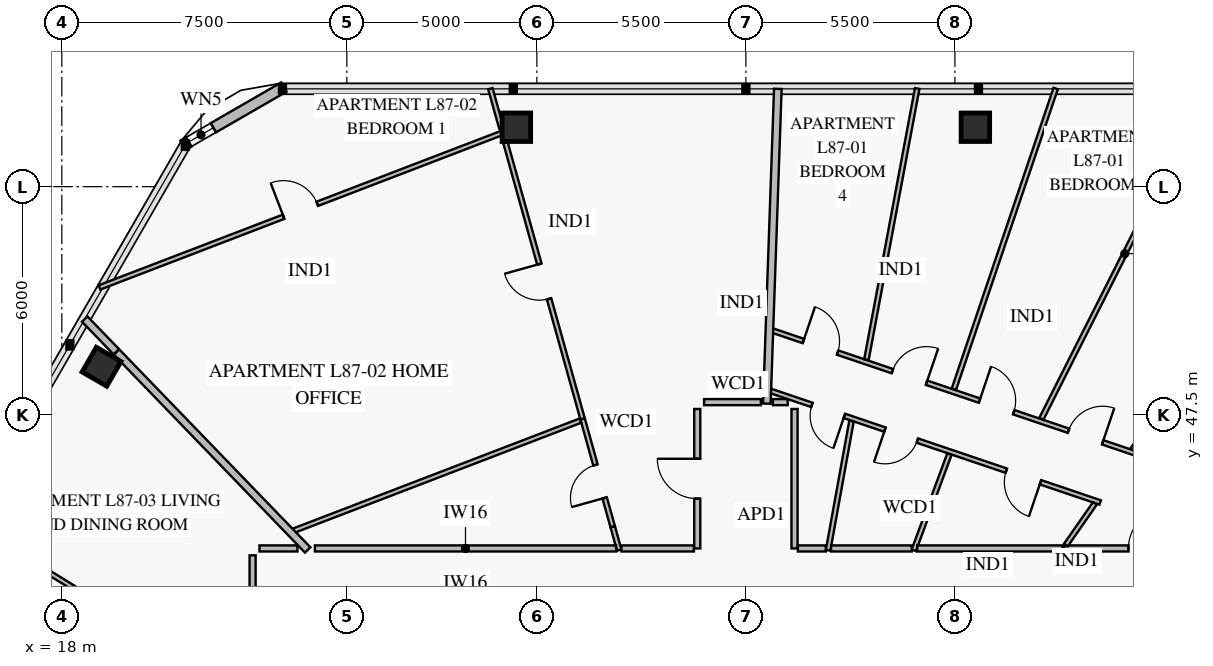
"""IFC4 building model, lengths in metres.
Left out: names, types, materials, properties, quantities, classifications, styles, units other than length and angle.
Written with IfcOpenShell. Run it as: python <this file> out.ifc"""

import sys

from ifc_helpers import new_model, si_unit, direction, frame, frame_2d, origin, origin_2d, place, context, subcontext, project, spatial, rectangle, extrude, element, fill, save


model = new_model("IFC4")
c1 = context("Model", 3, precision=1e-05, world=origin(), true_north=direction((0.0, 1.0)))
c2 = subcontext(c1, "Body", "Model", "MODEL_VIEW")
j1 = project(units=[si_unit("LENGTHUNIT", "METRE"), si_unit("PLANEANGLEUNIT", "RADIAN")], contexts=[c1])
p1 = place(None, origin())
s1 = spatial("IfcSite", under=j1, at=p1, CompositionType="ELEMENT")
p2 = place(p1, origin())
s2 = spatial("IfcBuilding", under=s1, at=p2, CompositionType="ELEMENT")
p3 = place(p2, frame((0.0, 0.0, 342.4)))
s3 = spatial("IfcBuildingStorey", under=s2, at=p3, CompositionType="ELEMENT", Elevation=342.4)
for number, where, z_axis, x_axis in (
    (1, (42.039, 55.064, 0.0), (0.0, 0.0, 1.0), (-1.0, 0.0, 0.0)),
    (2, (29.961, 55.064, 0.0), (0.0, 0.0, 1.0), (-1.0, 0.0, 0.0)),
    (3, (19.045, 48.762, 0.0), (0.0, 0.0, 1.0), (-0.5, -0.866, 0.0)),
):
    element("IfcColumn", number, at=place(p3, frame(where, z_axis=z_axis, x_axis=x_axis)), inside=s3, PredefinedType="COLUMN", context=c2, shape_type="SweptSolid", body=[
        extrude(rectangle(XDim=0.75, YDim=0.75, at=origin_2d()), origin(), (0.0, 0.0, 1.0), 3.55),
    ])
p4 = place(p3, frame((21.189, 54.589, 0.0), z_axis=(0.0, 0.0, 1.0), x_axis=(0.866023752521, 0.50000286006, 0.0)))
e4 = element("IfcWall", 4, at=p4, inside=s3, PredefinedType="SOLIDWALL", context=c2, shape_type="SweptSolid", body=[
    extrude(rectangle(XDim=3.065, YDim=0.28, at=frame_2d((1.532, 0.0))), origin(), (0.0, 0.0, 1.0), 3.55),
])
p5 = place(p4, frame((0.173, 0.0, 0.85)))
e5 = element("IfcOpeningElement", 5, at=p5, cuts=e4, PredefinedType="OPENING", context=c2, shape_type="SweptSolid", body=[
    extrude(rectangle(XDim=0.75, YDim=1.5, at=frame_2d((0.375, 0.75))), frame((0.0, 0.152, 0.0), z_axis=(0.0, -1.0, 0.0), x_axis=(1.0, 0.0, 0.0)), (0.0, 0.0, 1.0), 0.304),
])
p6 = place(p3, frame((45.323, 45.19, 0.0), z_axis=(0.0, 0.0, 1.0), x_axis=(-0.947209030083, 0.320616676625, 0.0)))
e6 = element("IfcWall", 6, at=p6, inside=s3, PredefinedType="PARTITIONING", context=c2, shape_type="SweptSolid", body=[
    extrude(rectangle(XDim=9.205, YDim=0.12, at=frame_2d((4.602, 0.0))), origin(), (0.0, 0.0, 1.0), 3.0),
])
p7 = place(p6, frame((1.659, 0.0, 0.0)))
e7 = element("IfcOpeningElement", 7, at=p7, cuts=e6, PredefinedType="OPENING", context=c2, shape_type="SweptSolid", body=[
    extrude(rectangle(XDim=0.95, YDim=2.1, at=frame_2d((0.475, 1.05))), frame((0.0, 0.072, 0.0), z_axis=(0.0, -1.0, 0.0), x_axis=(1.0, 0.0, 0.0)), (0.0, 0.0, 1.0), 0.144),
])
p8 = place(p6, frame((5.08, 0.0, 0.0)))
e8 = element("IfcOpeningElement", 8, at=p8, cuts=e6, PredefinedType="OPENING", context=c2, shape_type="SweptSolid", body=[
    extrude(rectangle(XDim=0.9, YDim=2.1, at=frame_2d((0.45, 1.05))), frame((0.0, 0.072, 0.0), z_axis=(0.0, -1.0, 0.0), x_axis=(1.0, 0.0, 0.0)), (0.0, 0.0, 1.0), 0.144),
])
p9 = place(p6, frame((7.107, 0.0, 0.0)))
e9 = element("IfcOpeningElement", 9, at=p9, cuts=e6, PredefinedType="OPENING", context=c2, shape_type="SweptSolid", body=[
    extrude(rectangle(XDim=0.9, YDim=2.1, at=frame_2d((0.45, 1.05))), frame((0.0, 0.072, 0.0), z_axis=(0.0, -1.0, 0.0), x_axis=(1.0, 0.0, 0.0)), (0.0, 0.0, 1.0), 0.144),
])
p10 = place(p3, frame((46.229, 46.488, 0.0), z_axis=(0.0, 0.0, 1.0), x_axis=(-0.947206471438, 0.320624235618, 0.0)))
e10 = element("IfcWall", 10, at=p10, inside=s3, PredefinedType="PARTITIONING", context=c2, shape_type="SweptSolid", body=[
    extrude(rectangle(XDim=10.088, YDim=0.12, at=frame_2d((5.044, 0.0))), origin(), (0.0, 0.0, 1.0), 3.0),
])
p11 = place(p10, frame((0.887, 0.0, 0.0)))
e11 = element("IfcOpeningElement", 11, at=p11, cuts=e10, PredefinedType="OPENING", context=c2, shape_type="SweptSolid", body=[
    extrude(rectangle(XDim=0.95, YDim=2.1, at=frame_2d((0.475, 1.05))), frame((0.0, 0.072, 0.0), z_axis=(0.0, -1.0, 0.0), x_axis=(1.0, 0.0, 0.0)), (0.0, 0.0, 1.0), 0.144),
])
p12 = place(p10, frame((3.358, 0.0, 0.0)))
e12 = element("IfcOpeningElement", 12, at=p12, cuts=e10, PredefinedType="OPENING", context=c2, shape_type="SweptSolid", body=[
    extrude(rectangle(XDim=0.95, YDim=2.1, at=frame_2d((0.475, 1.05))), frame((0.0, 0.072, 0.0), z_axis=(0.0, -1.0, 0.0), x_axis=(1.0, 0.0, 0.0)), (0.0, 0.0, 1.0), 0.144),
])
p13 = place(p10, frame((5.779, 0.0, 0.0)))
e13 = element("IfcOpeningElement", 13, at=p13, cuts=e10, PredefinedType="OPENING", context=c2, shape_type="SweptSolid", body=[
    extrude(rectangle(XDim=0.95, YDim=2.1, at=frame_2d((0.475, 1.05))), frame((0.0, 0.072, 0.0), z_axis=(0.0, -1.0, 0.0), x_axis=(1.0, 0.0, 0.0)), (0.0, 0.0, 1.0), 0.144),
])
p14 = place(p10, frame((8.251, 0.0, 0.0)))
e14 = element("IfcOpeningElement", 14, at=p14, cuts=e10, PredefinedType="OPENING", context=c2, shape_type="SweptSolid", body=[
    extrude(rectangle(XDim=0.95, YDim=2.1, at=frame_2d((0.475, 1.05))), frame((0.0, 0.072, 0.0), z_axis=(0.0, -1.0, 0.0), x_axis=(1.0, 0.0, 0.0)), (0.0, 0.0, 1.0), 0.144),
])
p15 = place(p3, frame((48.799, 43.98, 0.0), z_axis=(0.0, 0.0, 1.0), x_axis=(-1.0, 0.0, 0.0)))
e15 = element("IfcWall", 15, at=p15, inside=s3, PredefinedType="PARTITIONING", context=c2, shape_type="SweptSolid", body=[
    extrude(rectangle(XDim=4.418, YDim=0.16, at=frame_2d((2.209, 0.0))), origin(), (0.0, 0.0, 1.0), 3.0),
])
p16 = place(p15, frame((1.684, 0.0, 0.0)))
e16 = element("IfcOpeningElement", 16, at=p16, cuts=e15, PredefinedType="OPENING", context=c2, shape_type="SweptSolid", body=[
    extrude(rectangle(XDim=1.05, YDim=2.15, at=frame_2d((0.525, 1.075))), frame((0.0, 0.092, 0.0), z_axis=(0.0, -1.0, 0.0), x_axis=(1.0, 0.0, 0.0)), (0.0, 0.0, 1.0), 0.184),
])
p17 = place(p3, frame((32.496, 44.55, 0.0), z_axis=(0.0, 0.0, 1.0), x_axis=(-0.268945369645, 0.963155433015, 0.0)))
e17 = element("IfcWall", 17, at=p17, inside=s3, PredefinedType="PARTITIONING", context=c2, shape_type="SweptSolid", body=[
    extrude(rectangle(XDim=2.95, YDim=0.12, at=frame_2d((1.475, 0.0))), origin(), (0.0, 0.0, 1.0), 3.0),
])
p18 = place(p17, frame((0.789, 0.0, 0.0)))
e18 = element("IfcOpeningElement", 18, at=p18, cuts=e17, PredefinedType="OPENING", context=c2, shape_type="SweptSolid", body=[
    extrude(rectangle(XDim=0.9, YDim=2.1, at=frame_2d((0.45, 1.05))), frame((0.0, 0.072, 0.0), z_axis=(0.0, -1.0, 0.0), x_axis=(1.0, 0.0, 0.0)), (0.0, 0.0, 1.0), 0.144),
])
p19 = place(p3, frame((31.702, 47.392, 0.0), z_axis=(0.0, 0.0, 1.0), x_axis=(-0.268895171006, 0.963169448752, 0.0)))
e19 = element("IfcWall", 19, at=p19, inside=s3, PredefinedType="PARTITIONING", context=c2, shape_type="SweptSolid", body=[
    extrude(rectangle(XDim=7.556, YDim=0.12, at=frame_2d((3.778, 0.0))), origin(), (0.0, 0.0, 1.0), 3.55),
])
p20 = place(p19, frame((3.278, 0.0, 0.0)))
e20 = element("IfcOpeningElement", 20, at=p20, cuts=e19, PredefinedType="OPENING", context=c2, shape_type="SweptSolid", body=[
    extrude(rectangle(XDim=0.95, YDim=2.1, at=frame_2d((0.475, 1.05))), frame((0.0, 0.072, 0.0), z_axis=(0.0, -1.0, 0.0), x_axis=(1.0, 0.0, 0.0)), (0.0, 0.0, 1.0), 0.144),
])
p21 = place(p3, frame((29.566, 54.908, 0.0), z_axis=(0.0, 0.0, 1.0), x_axis=(-0.933585379148, -0.358355047184, 0.0)))
e21 = element("IfcWall", 21, at=p21, inside=s3, PredefinedType="PARTITIONING", context=c2, shape_type="SweptSolid", body=[
    extrude(rectangle(XDim=11.327, YDim=0.12, at=frame_2d((5.664, 0.0))), origin(), (0.0, 0.0, 1.0), 2.97),
])
p22 = place(p21, frame((5.188, 0.0, 0.0)))
e22 = element("IfcOpeningElement", 22, at=p22, cuts=e21, PredefinedType="OPENING", context=c2, shape_type="SweptSolid", body=[
    extrude(rectangle(XDim=0.95, YDim=2.1, at=frame_2d((0.475, 1.05))), frame((0.0, 0.072, 0.0), z_axis=(0.0, -1.0, 0.0), x_axis=(1.0, 0.0, 0.0)), (0.0, 0.0, 1.0), 0.144),
])
p23 = place(p3, frame((34.72, 47.65, 0.0), z_axis=(0.0, 0.0, 1.0), x_axis=(0.0, -1.0, 0.0)))
e23 = element("IfcWall", 23, at=p23, inside=s3, PredefinedType="PARTITIONING", context=c2, shape_type="SweptSolid", body=[
    extrude(rectangle(XDim=3.67, YDim=0.16, at=frame_2d((1.835, 0.0))), origin(), (0.0, 0.0, 1.0), 3.55),
])
p24 = place(p23, frame((1.31, 0.0, 0.0)))
e24 = element("IfcOpeningElement", 24, at=p24, cuts=e23, PredefinedType="OPENING", context=c2, shape_type="SweptSolid", body=[
    extrude(rectangle(XDim=1.05, YDim=2.15, at=frame_2d((0.525, 1.075))), frame((0.0, 0.092, 0.0), z_axis=(0.0, -1.0, 0.0), x_axis=(1.0, 0.0, 0.0)), (0.0, 0.0, 1.0), 0.184),
])
p25 = place(p3, frame((23.02, 43.799, 0.0), z_axis=(0.0, 0.0, 1.0), x_axis=(0.0, -1.0, 0.0)))
e25 = element("IfcWall", 25, at=p25, inside=s3, PredefinedType="PARTITIONING", context=c2, shape_type="SweptSolid", body=[
    extrude(rectangle(XDim=3.747, YDim=0.16, at=frame_2d((1.873, 0.0))), origin(), (0.0, 0.0, 1.0), 3.55),
])
p26 = place(p25, frame((1.348, 0.0, 0.0)))
e26 = element("IfcOpeningElement", 26, at=p26, cuts=e25, PredefinedType="OPENING", context=c2, shape_type="SweptSolid", body=[
    extrude(rectangle(XDim=1.05, YDim=2.15, at=frame_2d((0.525, 1.075))), frame((0.0, 0.092, 0.0), z_axis=(0.0, -1.0, 0.0), x_axis=(1.0, 0.0, 0.0)), (0.0, 0.0, 1.0), 0.184),
])
p27 = place(p3, frame((40.418, 43.93, 0.0), z_axis=(0.0, 0.0, 1.0), x_axis=(0.347234815936, 0.937778216105, 0.0)))
e27 = element("IfcWall", 27, at=p27, inside=s3, PredefinedType="PARTITIONING", context=c2, shape_type="SweptSolid", body=[
    extrude(rectangle(XDim=2.699, YDim=0.12, at=frame_2d((1.35, 0.0))), origin(), (0.0, 0.0, 1.0), 3.55),
])
p28 = place(p3, frame((38.163, 43.93, 0.0), z_axis=(0.0, 0.0, 1.0), x_axis=(0.178394636556, 0.983959020309, 0.0)))
e28 = element("IfcWall", 28, at=p28, inside=s3, PredefinedType="PARTITIONING", context=c2, shape_type="SweptSolid", body=[
    extrude(rectangle(XDim=3.458, YDim=0.12, at=frame_2d((1.729, 0.0))), origin(), (0.0, 0.0, 1.0), 3.55),
])
p29 = place(p3, frame((43.774, 47.39, 0.0), z_axis=(0.0, 0.0, 1.0), x_axis=(0.450869548037, 0.892589855787, 0.0)))
e29 = element("IfcWall", 29, at=p29, inside=s3, PredefinedType="PARTITIONING", context=c2, shape_type="SweptSolid", body=[
    extrude(rectangle(XDim=9.74, YDim=0.12, at=frame_2d((4.87, 0.0))), origin(), (0.0, 0.0, 1.0), 2.97),
])
p30 = place(p3, frame((41.473, 48.169, 0.0), z_axis=(0.0, 0.0, 1.0), x_axis=(0.32064215142, 0.947200406848, 0.0)))
e30 = element("IfcWall", 30, at=p30, inside=s3, PredefinedType="PARTITIONING", context=c2, shape_type="SweptSolid", body=[
    extrude(rectangle(XDim=8.356, YDim=0.12, at=frame_2d((4.178, 0.0))), origin(), (0.0, 0.0, 1.0), 2.97),
])
p31 = place(p3, frame((39.172, 48.948, 0.0), z_axis=(0.0, 0.0, 1.0), x_axis=(0.183929112918, 0.982939510561, 0.0)))
e31 = element("IfcWall", 31, at=p31, inside=s3, PredefinedType="PARTITIONING", context=c2, shape_type="SweptSolid", body=[
    extrude(rectangle(XDim=7.259, YDim=0.12, at=frame_2d((3.63, 0.0))), origin(), (0.0, 0.0, 1.0), 2.97),
])
p32 = place(p3, frame((44.419, 44.068, 0.0), z_axis=(0.0, 0.0, 1.0), x_axis=(0.572224421866, 0.820097074144, 0.0)))
e32 = element("IfcWall", 32, at=p32, inside=s3, PredefinedType="PARTITIONING", context=c2, shape_type="SweptSolid", body=[
    extrude(rectangle(XDim=1.338, YDim=0.12, at=frame_2d((0.669, 0.0))), origin(), (0.0, 0.0, 1.0), 3.55),
])
p33 = place(p3, frame((46.171, 46.579, 0.0), z_axis=(0.0, 0.0, 1.0), x_axis=(0.572144356321, 0.820152934233, 0.0)))
e33 = element("IfcWall", 33, at=p33, inside=s3, PredefinedType="PARTITIONING", context=c2, shape_type="SweptSolid", body=[
    extrude(rectangle(XDim=8.819, YDim=0.12, at=frame_2d((4.41, 0.0))), origin(), (0.0, 0.0, 1.0), 2.97),
])
p34 = place(p3, frame((36.552, 47.79, 0.0), z_axis=(0.0, 0.0, 1.0), x_axis=(0.034901510276, 0.999390756702, 0.0)))
e34 = element("IfcWall", 34, at=p34, inside=s3, PredefinedType="PARTITIONING", context=c2, shape_type="SweptSolid", body=[
    extrude(rectangle(XDim=8.289, YDim=0.2, at=frame_2d((4.145, 0.0))), origin(), (0.0, 0.0, 1.0), 2.97),
])
p35 = place(p3, frame((32.667, 43.936, 0.0), z_axis=(0.0, 0.0, 1.0), x_axis=(-0.268749408426, 0.963210130486, 0.0)))
e35 = element("IfcWall", 35, at=p35, inside=s3, PredefinedType="PARTITIONING", context=c2, shape_type="SweptSolid", body=[
    extrude(rectangle(XDim=0.638, YDim=0.12, at=frame_2d((0.319, 0.0))), origin(), (0.0, 0.0, 1.0), 3.0),
])
p36 = place(p3, frame((29.566, 55.043, 0.0), z_axis=(0.0, 0.0, 1.0), x_axis=(-0.268931170231, 0.963159397856, 0.0)))
e36 = element("IfcWall", 36, at=p36, inside=s3, PredefinedType="PARTITIONING", context=c2, shape_type="SweptSolid", body=[
    extrude(rectangle(XDim=1.076, YDim=0.12, at=frame_2d((0.538, 0.0))), origin(), (0.0, 0.0, 1.0), 3.122),
])
p37 = place(p3, frame((31.646, 47.343, 0.0), z_axis=(0.0, 0.0, 1.0), x_axis=(-0.933579396661, -0.358370632349, 0.0)))
e37 = element("IfcWall", 37, at=p37, inside=s3, PredefinedType="PARTITIONING", context=c2, shape_type="SweptSolid", body=[
    extrude(rectangle(XDim=8.121, YDim=0.12, at=frame_2d((4.061, 0.0))), origin(), (0.0, 0.0, 1.0), 3.55),
])
p38 = place(p3, frame((24.47, 43.94, 0.0), z_axis=(0.0, 0.0, 1.0), x_axis=(-0.694657696383, 0.719340451286, 0.0)))
e38 = element("IfcWall", 38, at=p38, inside=s3, PredefinedType="PARTITIONING", context=c2, shape_type="SweptSolid", body=[
    extrude(rectangle(XDim=7.24, YDim=0.2, at=frame_2d((3.62, 0.0))), origin(), (0.0, 0.0, 1.0), 2.97),
])
p39 = place(p3, frame((19.432, 49.156, 0.0), z_axis=(0.0, 0.0, 1.0), x_axis=(-0.694627356025, 0.719369749337, 0.0)))
e39 = element("IfcWall", 39, at=p39, inside=s3, PredefinedType="PARTITIONING", context=c2, shape_type="SweptSolid", body=[
    extrude(rectangle(XDim=1.194, YDim=0.2, at=frame_2d((0.597, 0.0))), origin(), (0.0, 0.0, 1.0), 3.122),
])
p40 = place(p3, frame((20.322, 41.698, 0.0), z_axis=(0.0, 0.0, 1.0), x_axis=(-0.850460895056, 0.526038274255, 0.0)))
e40 = element("IfcWall", 40, at=p40, inside=s3, PredefinedType="PARTITIONING", context=c2, shape_type="SweptSolid", body=[
    extrude(rectangle(XDim=5.66, YDim=0.12, at=frame_2d((2.83, 0.0))), origin(), (0.0, 0.0, 1.0), 2.97),
])
p41 = place(p3, frame((44.333, 43.98, 0.0), z_axis=(0.0, 0.0, 1.0), x_axis=(-1.0, 0.0, 0.0)))
e41 = element("IfcWall", 41, at=p41, inside=s3, PredefinedType="PARTITIONING", context=c2, shape_type="SweptSolid", body=[
    extrude(rectangle(XDim=3.824, YDim=0.16, at=frame_2d((1.912, 0.0))), origin(), (0.0, 0.0, 1.0), 3.55),
])
p42 = place(p3, frame((40.364, 43.98, 0.0), z_axis=(0.0, 0.0, 1.0), x_axis=(-1.0, 0.0, 0.0)))
e42 = element("IfcWall", 42, at=p42, inside=s3, PredefinedType="PARTITIONING", context=c2, shape_type="SweptSolid", body=[
    extrude(rectangle(XDim=2.123, YDim=0.16, at=frame_2d((1.061, 0.0))), origin(), (0.0, 0.0, 1.0), 3.0),
])
p43 = place(p3, frame((37.28, 43.98, 0.0), z_axis=(0.0, 0.0, 1.0), x_axis=(0.0, 1.0, 0.0)))
e43 = element("IfcWall", 43, at=p43, inside=s3, PredefinedType="PARTITIONING", context=c2, shape_type="SweptSolid", body=[
    extrude(rectangle(XDim=3.67, YDim=0.16, at=frame_2d((1.835, 0.0))), origin(), (0.0, 0.0, 1.0), 3.55),
])
p44 = place(p3, frame((38.103, 43.98, 0.0), z_axis=(0.0, 0.0, 1.0), x_axis=(-1.0, 0.0, 0.0)))
e44 = element("IfcWall", 44, at=p44, inside=s3, PredefinedType="PARTITIONING", context=c2, shape_type="SweptSolid", body=[
    extrude(rectangle(XDim=0.735, YDim=0.16, at=frame_2d((0.367, 0.0))), origin(), (0.0, 0.0, 1.0), 3.55),
])
p45 = place(p3, frame((37.1, 47.83, 0.0), z_axis=(0.0, 0.0, 1.0), x_axis=(-1.0, 0.0, 0.0)))
e45 = element("IfcWall", 45, at=p45, inside=s3, PredefinedType="PARTITIONING", context=c2, shape_type="SweptSolid", body=[
    extrude(rectangle(XDim=0.389, YDim=0.16, at=frame_2d((0.194, 0.0))), origin(), (0.0, 0.0, 1.0), 3.55),
])
p46 = place(p3, frame((34.632, 43.98, 0.0), z_axis=(0.0, 0.0, 1.0), x_axis=(-1.0, 0.0, 0.0)))
e46 = element("IfcWall", 46, at=p46, inside=s3, PredefinedType="PARTITIONING", context=c2, shape_type="SweptSolid", body=[
    extrude(rectangle(XDim=1.906, YDim=0.16, at=frame_2d((0.953, 0.0))), origin(), (0.0, 0.0, 1.0), 3.0),
])
p47 = place(p3, frame((36.395, 47.83, 0.0), z_axis=(0.0, 0.0, 1.0), x_axis=(-1.0, 0.0, 0.0)))
e47 = element("IfcWall", 47, at=p47, inside=s3, PredefinedType="PARTITIONING", context=c2, shape_type="SweptSolid", body=[
    extrude(rectangle(XDim=1.495, YDim=0.16, at=frame_2d((0.747, 0.0))), origin(), (0.0, 0.0, 1.0), 3.55),
])
p48 = place(p3, frame((32.584, 43.98, 0.0), z_axis=(0.0, 0.0, 1.0), x_axis=(-1.0, 0.0, 0.0)))
e48 = element("IfcWall", 48, at=p48, inside=s3, PredefinedType="PARTITIONING", context=c2, shape_type="SweptSolid", body=[
    extrude(rectangle(XDim=7.926, YDim=0.16, at=frame_2d((3.963, 0.0))), origin(), (0.0, 0.0, 1.0), 3.55),
])
p49 = place(p3, frame((24.199, 43.98, 0.0), z_axis=(0.0, 0.0, 1.0), x_axis=(-1.0, 0.0, 0.0)))
e49 = element("IfcWall", 49, at=p49, inside=s3, PredefinedType="PARTITIONING", context=c2, shape_type="SweptSolid", body=[
    extrude(rectangle(XDim=0.999, YDim=0.16, at=frame_2d((0.499, 0.0))), origin(), (0.0, 0.0, 1.0), 3.0),
])
p50 = place(p5, origin())
e50 = element("IfcWindow", 50, at=p50, inside=s3, PartitioningType="SINGLE_PANEL", PredefinedType="WINDOW", context=c2, shape_type="SweptSolid", body=[
    extrude(rectangle(XDim=0.75, YDim=1.5, at=frame_2d((0.375, 0.75))), frame((0.0, 0.03, 0.0), z_axis=(0.0, -1.0, 0.0), x_axis=(1.0, 0.0, 0.0)), (0.0, 0.0, 1.0), 0.06),
])
fill(e5, e50)
p51 = place(p7, origin())
e51 = element("IfcDoor", 51, at=p51, inside=s3, OperationType="SINGLE_SWING_LEFT", PredefinedType="DOOR", context=c2, shape_type="SweptSolid", body=[
    extrude(rectangle(XDim=0.95, YDim=2.1, at=frame_2d((0.475, 1.05))), frame((0.0, 0.025, 0.0), z_axis=(0.0, -1.0, 0.0), x_axis=(1.0, 0.0, 0.0)), (0.0, 0.0, 1.0), 0.05),
])
fill(e7, e51)
p52 = place(p8, origin())
e52 = element("IfcDoor", 52, at=p52, inside=s3, OperationType="SINGLE_SWING_RIGHT", PredefinedType="DOOR", context=c2, shape_type="SweptSolid", body=[
    extrude(rectangle(XDim=0.9, YDim=2.1, at=frame_2d((0.45, 1.05))), frame((0.0, 0.025, 0.0), z_axis=(0.0, -1.0, 0.0), x_axis=(1.0, 0.0, 0.0)), (0.0, 0.0, 1.0), 0.05),
])
fill(e8, e52)
p53 = place(p9, origin())
e53 = element("IfcDoor", 53, at=p53, inside=s3, OperationType="SINGLE_SWING_LEFT", PredefinedType="DOOR", context=c2, shape_type="SweptSolid", body=[
    extrude(rectangle(XDim=0.9, YDim=2.1, at=frame_2d((0.45, 1.05))), frame((0.0, 0.025, 0.0), z_axis=(0.0, -1.0, 0.0), x_axis=(1.0, 0.0, 0.0)), (0.0, 0.0, 1.0), 0.05),
])
fill(e9, e53)
p54 = place(p11, frame((0.95, 0.0, 0.0), z_axis=(0.0, 0.0, 1.0), x_axis=(-1.0, 0.0, 0.0)))
e54 = element("IfcDoor", 54, at=p54, inside=s3, OperationType="SINGLE_SWING_RIGHT", PredefinedType="DOOR", context=c2, shape_type="SweptSolid", body=[
    extrude(rectangle(XDim=0.95, YDim=2.1, at=frame_2d((0.475, 1.05))), frame((0.0, 0.025, 0.0), z_axis=(0.0, -1.0, 0.0), x_axis=(1.0, 0.0, 0.0)), (0.0, 0.0, 1.0), 0.05),
])
fill(e11, e54)
p55 = place(p12, frame((0.95, 0.0, 0.0), z_axis=(0.0, 0.0, 1.0), x_axis=(-1.0, 0.0, 0.0)))
e55 = element("IfcDoor", 55, at=p55, inside=s3, OperationType="SINGLE_SWING_LEFT", PredefinedType="DOOR", context=c2, shape_type="SweptSolid", body=[
    extrude(rectangle(XDim=0.95, YDim=2.1, at=frame_2d((0.475, 1.05))), frame((0.0, 0.025, 0.0), z_axis=(0.0, -1.0, 0.0), x_axis=(1.0, 0.0, 0.0)), (0.0, 0.0, 1.0), 0.05),
])
fill(e12, e55)
p56 = place(p13, frame((0.95, 0.0, 0.0), z_axis=(0.0, 0.0, 1.0), x_axis=(-1.0, 0.0, 0.0)))
e56 = element("IfcDoor", 56, at=p56, inside=s3, OperationType="SINGLE_SWING_RIGHT", PredefinedType="DOOR", context=c2, shape_type="SweptSolid", body=[
    extrude(rectangle(XDim=0.95, YDim=2.1, at=frame_2d((0.475, 1.05))), frame((0.0, 0.025, 0.0), z_axis=(0.0, -1.0, 0.0), x_axis=(1.0, 0.0, 0.0)), (0.0, 0.0, 1.0), 0.05),
])
fill(e13, e56)
p57 = place(p14, frame((0.95, 0.0, 0.0), z_axis=(0.0, 0.0, 1.0), x_axis=(-1.0, 0.0, 0.0)))
e57 = element("IfcDoor", 57, at=p57, inside=s3, OperationType="SINGLE_SWING_LEFT", PredefinedType="DOOR", context=c2, shape_type="SweptSolid", body=[
    extrude(rectangle(XDim=0.95, YDim=2.1, at=frame_2d((0.475, 1.05))), frame((0.0, 0.025, 0.0), z_axis=(0.0, -1.0, 0.0), x_axis=(1.0, 0.0, 0.0)), (0.0, 0.0, 1.0), 0.05),
])
fill(e14, e57)
p58 = place(p16, frame((1.05, 0.0, 0.0), z_axis=(0.0, 0.0, 1.0), x_axis=(-1.0, 0.0, 0.0)))
e58 = element("IfcDoor", 58, at=p58, inside=s3, OperationType="SINGLE_SWING_RIGHT", PredefinedType="DOOR", context=c2, shape_type="SweptSolid", body=[
    extrude(rectangle(XDim=1.05, YDim=2.15, at=frame_2d((0.525, 1.075))), frame((0.0, 0.025, 0.0), z_axis=(0.0, -1.0, 0.0), x_axis=(1.0, 0.0, 0.0)), (0.0, 0.0, 1.0), 0.05),
])
fill(e16, e58)
p59 = place(p18, origin())
e59 = element("IfcDoor", 59, at=p59, inside=s3, OperationType="SINGLE_SWING_LEFT", PredefinedType="DOOR", context=c2, shape_type="SweptSolid", body=[
    extrude(rectangle(XDim=0.9, YDim=2.1, at=frame_2d((0.45, 1.05))), frame((0.0, 0.025, 0.0), z_axis=(0.0, -1.0, 0.0), x_axis=(1.0, 0.0, 0.0)), (0.0, 0.0, 1.0), 0.05),
])
fill(e18, e59)
p60 = place(p20, origin())
e60 = element("IfcDoor", 60, at=p60, inside=s3, OperationType="SINGLE_SWING_RIGHT", PredefinedType="DOOR", context=c2, shape_type="SweptSolid", body=[
    extrude(rectangle(XDim=0.95, YDim=2.1, at=frame_2d((0.475, 1.05))), frame((0.0, 0.025, 0.0), z_axis=(0.0, -1.0, 0.0), x_axis=(1.0, 0.0, 0.0)), (0.0, 0.0, 1.0), 0.05),
])
fill(e20, e60)
p61 = place(p22, frame((0.95, 0.0, 0.0), z_axis=(0.0, 0.0, 1.0), x_axis=(-1.0, 0.0, 0.0)))
e61 = element("IfcDoor", 61, at=p61, inside=s3, OperationType="SINGLE_SWING_LEFT", PredefinedType="DOOR", context=c2, shape_type="SweptSolid", body=[
    extrude(rectangle(XDim=0.95, YDim=2.1, at=frame_2d((0.475, 1.05))), frame((0.0, 0.025, 0.0), z_axis=(0.0, -1.0, 0.0), x_axis=(1.0, 0.0, 0.0)), (0.0, 0.0, 1.0), 0.05),
])
fill(e22, e61)
p62 = place(p24, frame((1.05, 0.0, 0.0), z_axis=(0.0, 0.0, 1.0), x_axis=(-1.0, 0.0, 0.0)))
e62 = element("IfcDoor", 62, at=p62, inside=s3, OperationType="SINGLE_SWING_RIGHT", PredefinedType="DOOR", context=c2, shape_type="SweptSolid", body=[
    extrude(rectangle(XDim=1.05, YDim=2.15, at=frame_2d((0.525, 1.075))), frame((0.0, 0.025, 0.0), z_axis=(0.0, -1.0, 0.0), x_axis=(1.0, 0.0, 0.0)), (0.0, 0.0, 1.0), 0.05),
])
fill(e24, e62)
save(model, sys.argv[1])
